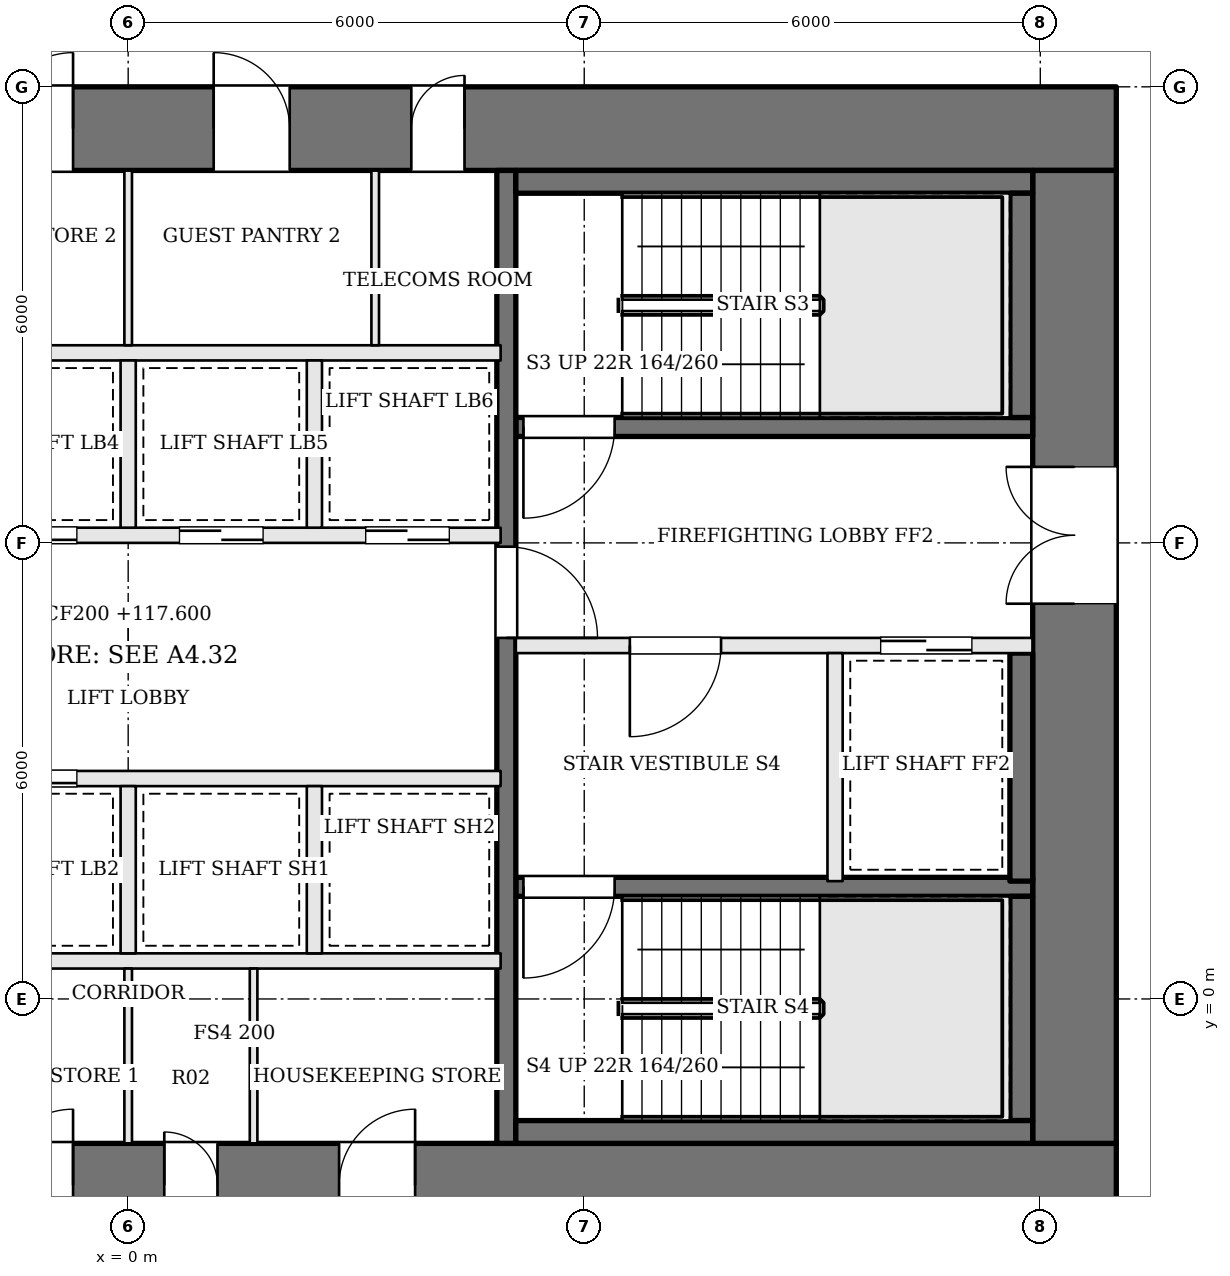
"""IFC4 building model, lengths in metres.
Left out: names, types, materials, properties, quantities, classifications, styles, units other than length and angle.
Written with IfcOpenShell. Run it as: python <this file> out.ifc"""

import sys

from ifc_helpers import new_model, si_unit, direction, frame, frame_2d, origin, place, context, subcontext, project, spatial, rectangle, extrude, element, fill, save


model = new_model("IFC4")
c1 = context("Model", 3, precision=1e-05, world=origin(), true_north=direction((0.0, 1.0)))
c2 = subcontext(c1, "Body", "Model", "MODEL_VIEW")
j1 = project(units=[si_unit("LENGTHUNIT", "METRE"), si_unit("PLANEANGLEUNIT", "RADIAN")], contexts=[c1])
p1 = place(None, origin())
s1 = spatial("IfcSite", under=j1, at=p1, CompositionType="ELEMENT")
p2 = place(p1, origin())
s2 = spatial("IfcBuilding", under=s1, at=p2, CompositionType="ELEMENT")
p3 = place(p2, frame((0.0, 0.0, 117.6)))
s3 = spatial("IfcBuildingStorey", under=s2, at=p3, CompositionType="ELEMENT", Elevation=117.6)
p4 = place(p3, frame((-13.0, 11.45, 0.0), z_axis=(0.0, 0.0, 1.0), x_axis=(1.0, 0.0, 0.0)))
e1 = element("IfcWall", 1, at=p4, inside=s3, PredefinedType="SHEAR", context=c2, shape_type="SweptSolid", body=[
    extrude(rectangle(XDim=26.0, YDim=1.1, at=frame_2d((13.0, 0.0))), origin(), (0.0, 0.0, 1.0), 3.6),
])
p5 = place(p4, frame((8.825, 0.0, 0.0)))
e2 = element("IfcOpeningElement", 2, at=p5, cuts=e1, PredefinedType="OPENING", context=c2, shape_type="SweptSolid", body=[
    extrude(rectangle(XDim=1.0, YDim=2.1, at=frame_2d((0.5, 1.05))), frame((0.0, 0.56, 0.0), z_axis=(0.0, -1.0, 0.0), x_axis=(1.0, 0.0, 0.0)), (0.0, 0.0, 1.0), 1.12),
])
p6 = place(p4, frame((11.275, 0.0, 0.0)))
e3 = element("IfcOpeningElement", 3, at=p6, cuts=e1, PredefinedType="OPENING", context=c2, shape_type="SweptSolid", body=[
    extrude(rectangle(XDim=1.0, YDim=2.1, at=frame_2d((0.5, 1.05))), frame((0.0, 0.56, 0.0), z_axis=(0.0, -1.0, 0.0), x_axis=(1.0, 0.0, 0.0)), (0.0, 0.0, 1.0), 1.12),
])
p7 = place(p4, frame((14.125, 0.0, 0.0)))
e4 = element("IfcOpeningElement", 4, at=p7, cuts=e1, PredefinedType="OPENING", context=c2, shape_type="SweptSolid", body=[
    extrude(rectangle(XDim=1.0, YDim=2.1, at=frame_2d((0.5, 1.05))), frame((0.0, 0.56, 0.0), z_axis=(0.0, -1.0, 0.0), x_axis=(1.0, 0.0, 0.0)), (0.0, 0.0, 1.0), 1.12),
])
p8 = place(p4, frame((16.725, 0.0, 0.0)))
e5 = element("IfcOpeningElement", 5, at=p8, cuts=e1, PredefinedType="OPENING", context=c2, shape_type="SweptSolid", body=[
    extrude(rectangle(XDim=0.7, YDim=2.1, at=frame_2d((0.35, 1.05))), frame((0.0, 0.56, 0.0), z_axis=(0.0, -1.0, 0.0), x_axis=(1.0, 0.0, 0.0)), (0.0, 0.0, 1.0), 1.12),
])
p9 = place(p3, frame((-13.0, -2.45, 0.0), z_axis=(0.0, 0.0, 1.0), x_axis=(1.0, 0.0, 0.0)))
e6 = element("IfcWall", 6, at=p9, inside=s3, PredefinedType="SHEAR", context=c2, shape_type="SweptSolid", body=[
    extrude(rectangle(XDim=26.0, YDim=1.1, at=frame_2d((13.0, 0.0))), origin(), (0.0, 0.0, 1.0), 3.6),
])
p10 = place(p9, frame((8.825, 0.0, 0.0)))
e7 = element("IfcOpeningElement", 7, at=p10, cuts=e6, PredefinedType="OPENING", context=c2, shape_type="SweptSolid", body=[
    extrude(rectangle(XDim=1.0, YDim=2.1, at=frame_2d((0.5, 1.05))), frame((0.0, 0.56, 0.0), z_axis=(0.0, -1.0, 0.0), x_axis=(1.0, 0.0, 0.0)), (0.0, 0.0, 1.0), 1.12),
])
p11 = place(p9, frame((11.275, 0.0, 0.0)))
e8 = element("IfcOpeningElement", 8, at=p11, cuts=e6, PredefinedType="OPENING", context=c2, shape_type="SweptSolid", body=[
    extrude(rectangle(XDim=1.0, YDim=2.1, at=frame_2d((0.5, 1.05))), frame((0.0, 0.56, 0.0), z_axis=(0.0, -1.0, 0.0), x_axis=(1.0, 0.0, 0.0)), (0.0, 0.0, 1.0), 1.12),
])
p12 = place(p9, frame((13.475, 0.0, 0.0)))
e9 = element("IfcOpeningElement", 9, at=p12, cuts=e6, PredefinedType="OPENING", context=c2, shape_type="SweptSolid", body=[
    extrude(rectangle(XDim=0.7, YDim=2.1, at=frame_2d((0.35, 1.05))), frame((0.0, 0.56, 0.0), z_axis=(0.0, -1.0, 0.0), x_axis=(1.0, 0.0, 0.0)), (0.0, 0.0, 1.0), 1.12),
])
p13 = place(p9, frame((15.775, 0.0, 0.0)))
e10 = element("IfcOpeningElement", 10, at=p13, cuts=e6, PredefinedType="OPENING", context=c2, shape_type="SweptSolid", body=[
    extrude(rectangle(XDim=1.0, YDim=2.1, at=frame_2d((0.5, 1.05))), frame((0.0, 0.56, 0.0), z_axis=(0.0, -1.0, 0.0), x_axis=(1.0, 0.0, 0.0)), (0.0, 0.0, 1.0), 1.12),
])
p14 = place(p3, frame((12.45, -1.9, 0.0), z_axis=(0.0, 0.0, 1.0), x_axis=(0.0, 1.0, 0.0)))
e11 = element("IfcWall", 11, at=p14, inside=s3, PredefinedType="SHEAR", context=c2, shape_type="SweptSolid", body=[
    extrude(rectangle(XDim=12.8, YDim=1.1, at=frame_2d((6.4, 0.0))), origin(), (0.0, 0.0, 1.0), 3.6),
])
p15 = place(p14, frame((7.1, 0.0, 0.0)))
e12 = element("IfcOpeningElement", 12, at=p15, cuts=e11, PredefinedType="OPENING", context=c2, shape_type="SweptSolid", body=[
    extrude(rectangle(XDim=1.8, YDim=2.1, at=frame_2d((0.9, 1.05))), frame((0.0, 0.56, 0.0), z_axis=(0.0, -1.0, 0.0), x_axis=(1.0, 0.0, 0.0)), (0.0, 0.0, 1.0), 1.12),
])
p16 = place(p3, frame((11.9, 7.525, 0.0), z_axis=(0.0, 0.0, 1.0), x_axis=(-1.0, 0.0, 0.0)))
e13 = element("IfcWall", 13, at=p16, inside=s3, PredefinedType="SOLIDWALL", context=c2, shape_type="SweptSolid", body=[
    extrude(rectangle(XDim=6.8, YDim=0.25, at=frame_2d((3.4, 0.0))), origin(), (0.0, 0.0, 1.0), 3.3),
])
p17 = place(p16, frame((5.5, 0.0, 0.0)))
e14 = element("IfcOpeningElement", 14, at=p17, cuts=e13, PredefinedType="OPENING", context=c2, shape_type="SweptSolid", body=[
    extrude(rectangle(XDim=1.2, YDim=2.1, at=frame_2d((0.6, 1.05))), frame((0.0, 0.135, 0.0), z_axis=(0.0, -1.0, 0.0), x_axis=(1.0, 0.0, 0.0)), (0.0, 0.0, 1.0), 0.27),
])
p18 = place(p3, frame((11.9, 4.65, 0.0), z_axis=(0.0, 0.0, 1.0), x_axis=(-1.0, 0.0, 0.0)))
e15 = element("IfcWall", 15, at=p18, inside=s3, PredefinedType="SOLIDWALL", context=c2, shape_type="SweptSolid", body=[
    extrude(rectangle(XDim=6.8, YDim=0.2, at=frame_2d((3.4, 0.0))), origin(), (0.0, 0.0, 1.0), 3.3),
])
p19 = place(p18, frame((4.1, 0.0, 0.0)))
e16 = element("IfcOpeningElement", 16, at=p19, cuts=e15, PredefinedType="OPENING", context=c2, shape_type="SweptSolid", body=[
    extrude(rectangle(XDim=1.2, YDim=2.1, at=frame_2d((0.6, 1.05))), frame((0.0, 0.11, 0.0), z_axis=(0.0, -1.0, 0.0), x_axis=(1.0, 0.0, 0.0)), (0.0, 0.0, 1.0), 0.22),
])
p20 = place(p18, frame((0.8, 0.0, 0.0)))
e17 = element("IfcOpeningElement", 17, at=p20, cuts=e15, PredefinedType="OPENING", context=c2, shape_type="SweptSolid", body=[
    extrude(rectangle(XDim=1.2, YDim=2.1, at=frame_2d((0.6, 1.05))), frame((0.0, 0.11, 0.0), z_axis=(0.0, -1.0, 0.0), x_axis=(1.0, 0.0, 0.0)), (0.0, 0.0, 1.0), 0.22),
])
p21 = place(p3, frame((11.9, 1.475, 0.0), z_axis=(0.0, 0.0, 1.0), x_axis=(-1.0, 0.0, 0.0)))
e18 = element("IfcWall", 18, at=p21, inside=s3, PredefinedType="SOLIDWALL", context=c2, shape_type="SweptSolid", body=[
    extrude(rectangle(XDim=6.8, YDim=0.25, at=frame_2d((3.4, 0.0))), origin(), (0.0, 0.0, 1.0), 3.3),
])
p22 = place(p21, frame((5.5, 0.0, 0.0)))
e19 = element("IfcOpeningElement", 19, at=p22, cuts=e18, PredefinedType="OPENING", context=c2, shape_type="SweptSolid", body=[
    extrude(rectangle(XDim=1.2, YDim=2.1, at=frame_2d((0.6, 1.05))), frame((0.0, 0.135, 0.0), z_axis=(0.0, -1.0, 0.0), x_axis=(1.0, 0.0, 0.0)), (0.0, 0.0, 1.0), 0.27),
])
p23 = place(p3, frame((9.3, 4.55, 0.0), z_axis=(0.0, 0.0, 1.0), x_axis=(0.0, -1.0, 0.0)))
e20 = element("IfcWall", 20, at=p23, inside=s3, PredefinedType="SOLIDWALL", context=c2, shape_type="SweptSolid", body=[
    extrude(rectangle(XDim=3.0, YDim=0.2, at=frame_2d((1.5, 0.0))), origin(), (0.0, 0.0, 1.0), 3.3),
])
p24 = place(p3, frame((4.975, 10.9, 0.0), z_axis=(0.0, 0.0, 1.0), x_axis=(0.0, -1.0, 0.0)))
e21 = element("IfcWall", 21, at=p24, inside=s3, PredefinedType="SOLIDWALL", context=c2, shape_type="SweptSolid", body=[
    extrude(rectangle(XDim=12.8, YDim=0.25, at=frame_2d((6.4, 0.0))), origin(), (0.0, 0.0, 1.0), 3.3),
])
p25 = place(p24, frame((4.95, 0.0, 0.0)))
e22 = element("IfcOpeningElement", 22, at=p25, cuts=e21, PredefinedType="OPENING", context=c2, shape_type="SweptSolid", body=[
    extrude(rectangle(XDim=1.2, YDim=2.1, at=frame_2d((0.6, 1.05))), frame((0.0, 0.135, 0.0), z_axis=(0.0, -1.0, 0.0), x_axis=(1.0, 0.0, 0.0)), (0.0, 0.0, 1.0), 0.27),
])
p26 = place(p3, frame((11.9, 10.75, 0.0), z_axis=(0.0, 0.0, 1.0), x_axis=(-1.0, 0.0, 0.0)))
e23 = element("IfcWall", 23, at=p26, inside=s3, PredefinedType="SOLIDWALL", context=c2, shape_type="SweptSolid", body=[
    extrude(rectangle(XDim=6.8, YDim=0.3, at=frame_2d((3.4, 0.0))), origin(), (0.0, 0.0, 1.0), 3.3),
])
p27 = place(p3, frame((11.75, 10.6, 0.0), z_axis=(0.0, 0.0, 1.0), x_axis=(0.0, -1.0, 0.0)))
e24 = element("IfcWall", 24, at=p27, inside=s3, PredefinedType="SOLIDWALL", context=c2, shape_type="SweptSolid", body=[
    extrude(rectangle(XDim=2.95, YDim=0.3, at=frame_2d((1.475, 0.0))), origin(), (0.0, 0.0, 1.0), 3.3),
])
p28 = place(p3, frame((11.75, 4.55, 0.0), z_axis=(0.0, 0.0, 1.0), x_axis=(0.0, -1.0, 0.0)))
e25 = element("IfcWall", 25, at=p28, inside=s3, PredefinedType="SOLIDWALL", context=c2, shape_type="SweptSolid", body=[
    extrude(rectangle(XDim=3.0, YDim=0.3, at=frame_2d((1.5, 0.0))), origin(), (0.0, 0.0, 1.0), 3.3),
])
p29 = place(p3, frame((11.75, 1.35, 0.0), z_axis=(0.0, 0.0, 1.0), x_axis=(0.0, -1.0, 0.0)))
e26 = element("IfcWall", 26, at=p29, inside=s3, PredefinedType="SOLIDWALL", context=c2, shape_type="SweptSolid", body=[
    extrude(rectangle(XDim=2.95, YDim=0.3, at=frame_2d((1.475, 0.0))), origin(), (0.0, 0.0, 1.0), 3.3),
])
p30 = place(p3, frame((11.9, -1.75, 0.0), z_axis=(0.0, 0.0, 1.0), x_axis=(-1.0, 0.0, 0.0)))
e27 = element("IfcWall", 27, at=p30, inside=s3, PredefinedType="SOLIDWALL", context=c2, shape_type="SweptSolid", body=[
    extrude(rectangle(XDim=6.8, YDim=0.3, at=frame_2d((3.4, 0.0))), origin(), (0.0, 0.0, 1.0), 3.3),
])
p31 = place(p3, frame((-4.9, 0.5, 0.0), z_axis=(0.0, 0.0, 1.0), x_axis=(1.0, 0.0, 0.0)))
e28 = element("IfcWall", 28, at=p31, inside=s3, PredefinedType="SOLIDWALL", context=c2, shape_type="SweptSolid", body=[
    extrude(rectangle(XDim=9.8, YDim=0.2, at=frame_2d((4.9, 0.0))), origin(), (0.0, 0.0, 1.0), 3.3),
])
p32 = place(p3, frame((-4.9, 2.9, 0.0), z_axis=(0.0, 0.0, 1.0), x_axis=(1.0, 0.0, 0.0)))
e29 = element("IfcWall", 29, at=p32, inside=s3, PredefinedType="SOLIDWALL", context=c2, shape_type="SweptSolid", body=[
    extrude(rectangle(XDim=9.8, YDim=0.2, at=frame_2d((4.9, 0.0))), origin(), (0.0, 0.0, 1.0), 3.3),
])
p33 = place(p32, frame((0.675, 0.0, 0.0)))
e30 = element("IfcOpeningElement", 30, at=p33, cuts=e29, PredefinedType="OPENING", context=c2, shape_type="SweptSolid", body=[
    extrude(rectangle(XDim=1.1, YDim=2.1, at=frame_2d((0.55, 1.05))), frame((0.0, 0.11, 0.0), z_axis=(0.0, -1.0, 0.0), x_axis=(1.0, 0.0, 0.0)), (0.0, 0.0, 1.0), 0.22),
])
p34 = place(p32, frame((3.125, 0.0, 0.0)))
e31 = element("IfcOpeningElement", 31, at=p34, cuts=e29, PredefinedType="OPENING", context=c2, shape_type="SweptSolid", body=[
    extrude(rectangle(XDim=1.1, YDim=2.1, at=frame_2d((0.55, 1.05))), frame((0.0, 0.11, 0.0), z_axis=(0.0, -1.0, 0.0), x_axis=(1.0, 0.0, 0.0)), (0.0, 0.0, 1.0), 0.22),
])
p35 = place(p3, frame((-4.9, 6.1, 0.0), z_axis=(0.0, 0.0, 1.0), x_axis=(1.0, 0.0, 0.0)))
e32 = element("IfcWall", 32, at=p35, inside=s3, PredefinedType="SOLIDWALL", context=c2, shape_type="SweptSolid", body=[
    extrude(rectangle(XDim=9.8, YDim=0.2, at=frame_2d((4.9, 0.0))), origin(), (0.0, 0.0, 1.0), 3.3),
])
p36 = place(p35, frame((0.675, 0.0, 0.0)))
e33 = element("IfcOpeningElement", 33, at=p36, cuts=e32, PredefinedType="OPENING", context=c2, shape_type="SweptSolid", body=[
    extrude(rectangle(XDim=1.1, YDim=2.1, at=frame_2d((0.55, 1.05))), frame((0.0, 0.11, 0.0), z_axis=(0.0, -1.0, 0.0), x_axis=(1.0, 0.0, 0.0)), (0.0, 0.0, 1.0), 0.22),
])
p37 = place(p35, frame((3.125, 0.0, 0.0)))
e34 = element("IfcOpeningElement", 34, at=p37, cuts=e32, PredefinedType="OPENING", context=c2, shape_type="SweptSolid", body=[
    extrude(rectangle(XDim=1.1, YDim=2.1, at=frame_2d((0.55, 1.05))), frame((0.0, 0.11, 0.0), z_axis=(0.0, -1.0, 0.0), x_axis=(1.0, 0.0, 0.0)), (0.0, 0.0, 1.0), 0.22),
])
p38 = place(p35, frame((5.575, 0.0, 0.0)))
e35 = element("IfcOpeningElement", 35, at=p38, cuts=e32, PredefinedType="OPENING", context=c2, shape_type="SweptSolid", body=[
    extrude(rectangle(XDim=1.1, YDim=2.1, at=frame_2d((0.55, 1.05))), frame((0.0, 0.11, 0.0), z_axis=(0.0, -1.0, 0.0), x_axis=(1.0, 0.0, 0.0)), (0.0, 0.0, 1.0), 0.22),
])
p39 = place(p35, frame((8.025, 0.0, 0.0)))
e36 = element("IfcOpeningElement", 36, at=p39, cuts=e32, PredefinedType="OPENING", context=c2, shape_type="SweptSolid", body=[
    extrude(rectangle(XDim=1.1, YDim=2.1, at=frame_2d((0.55, 1.05))), frame((0.0, 0.11, 0.0), z_axis=(0.0, -1.0, 0.0), x_axis=(1.0, 0.0, 0.0)), (0.0, 0.0, 1.0), 0.22),
])
p40 = place(p3, frame((-4.9, 8.5, 0.0), z_axis=(0.0, 0.0, 1.0), x_axis=(1.0, 0.0, 0.0)))
e37 = element("IfcWall", 37, at=p40, inside=s3, PredefinedType="SOLIDWALL", context=c2, shape_type="SweptSolid", body=[
    extrude(rectangle(XDim=9.8, YDim=0.2, at=frame_2d((4.9, 0.0))), origin(), (0.0, 0.0, 1.0), 3.3),
])
for number, where, z_axis, x_axis in (
    (38, (0.0, 0.6, 0.0), (0.0, 0.0, 1.0), (0.0, 1.0, 0.0)),
    (39, (2.45, 0.6, 0.0), (0.0, 0.0, 1.0), (0.0, 1.0, 0.0)),
    (40, (0.0, 6.2, 0.0), (0.0, 0.0, 1.0), (0.0, 1.0, 0.0)),
    (41, (2.45, 6.2, 0.0), (0.0, 0.0, 1.0), (0.0, 1.0, 0.0)),
):
    element("IfcWall", number, at=place(p3, frame(where, z_axis=z_axis, x_axis=x_axis)), inside=s3, PredefinedType="SOLIDWALL", context=c2, shape_type="SweptSolid", body=[
        extrude(rectangle(XDim=2.2, YDim=0.2, at=frame_2d((1.1, 0.0))), origin(), (0.0, 0.0, 1.0), 3.3),
    ])
for number, where, z_axis, x_axis in (
    (42, (0.0, -1.9, 0.0), (0.0, 0.0, 1.0), (0.0, 1.0, 0.0)),
    (43, (1.65, -1.9, 0.0), (0.0, 0.0, 1.0), (0.0, 1.0, 0.0)),
    (44, (0.0, 8.6, 0.0), (0.0, 0.0, 1.0), (0.0, 1.0, 0.0)),
    (45, (3.25, 8.6, 0.0), (0.0, 0.0, 1.0), (0.0, 1.0, 0.0)),
):
    element("IfcWall", number, at=place(p3, frame(where, z_axis=z_axis, x_axis=x_axis)), inside=s3, PredefinedType="PARTITIONING", context=c2, shape_type="SweptSolid", body=[
        extrude(rectangle(XDim=2.3, YDim=0.1, at=frame_2d((1.15, 0.0))), origin(), (0.0, 0.0, 1.0), 3.3),
    ])
p41 = place(p15, origin())
e46 = element("IfcDoor", 46, at=p41, inside=s3, OperationType="DOUBLE_DOOR_SINGLE_SWING", PredefinedType="DOOR", context=c2, shape_type="SweptSolid", body=[
    extrude(rectangle(XDim=1.8, YDim=2.1, at=frame_2d((0.9, 1.05))), frame((0.0, 0.025, 0.0), z_axis=(0.0, -1.0, 0.0), x_axis=(1.0, 0.0, 0.0)), (0.0, 0.0, 1.0), 0.05),
])
fill(e12, e46)
p42 = place(p25, origin())
e47 = element("IfcDoor", 47, at=p42, inside=s3, OperationType="SINGLE_SWING_RIGHT", PredefinedType="DOOR", context=c2, shape_type="SweptSolid", body=[
    extrude(rectangle(XDim=1.2, YDim=2.1, at=frame_2d((0.6, 1.05))), frame((0.0, 0.025, 0.0), z_axis=(0.0, -1.0, 0.0), x_axis=(1.0, 0.0, 0.0)), (0.0, 0.0, 1.0), 0.05),
])
fill(e22, e47)
p43 = place(p19, origin())
e48 = element("IfcDoor", 48, at=p43, inside=s3, OperationType="SINGLE_SWING_RIGHT", PredefinedType="DOOR", context=c2, shape_type="SweptSolid", body=[
    extrude(rectangle(XDim=1.2, YDim=2.1, at=frame_2d((0.6, 1.05))), frame((0.0, 0.025, 0.0), z_axis=(0.0, -1.0, 0.0), x_axis=(1.0, 0.0, 0.0)), (0.0, 0.0, 1.0), 0.05),
])
fill(e16, e48)
p44 = place(p17, origin())
e49 = element("IfcDoor", 49, at=p44, inside=s3, OperationType="SINGLE_SWING_RIGHT", PredefinedType="DOOR", context=c2, shape_type="SweptSolid", body=[
    extrude(rectangle(XDim=1.2, YDim=2.1, at=frame_2d((0.6, 1.05))), frame((0.0, 0.025, 0.0), z_axis=(0.0, -1.0, 0.0), x_axis=(1.0, 0.0, 0.0)), (0.0, 0.0, 1.0), 0.05),
])
fill(e14, e49)
p45 = place(p22, origin())
e50 = element("IfcDoor", 50, at=p45, inside=s3, OperationType="SINGLE_SWING_RIGHT", PredefinedType="DOOR", context=c2, shape_type="SweptSolid", body=[
    extrude(rectangle(XDim=1.2, YDim=2.1, at=frame_2d((0.6, 1.05))), frame((0.0, 0.025, 0.0), z_axis=(0.0, -1.0, 0.0), x_axis=(1.0, 0.0, 0.0)), (0.0, 0.0, 1.0), 0.05),
])
fill(e19, e50)
p46 = place(p20, origin())
e51 = element("IfcDoor", 51, at=p46, inside=s3, OperationType="SLIDING_TO_RIGHT", PredefinedType="DOOR", context=c2, shape_type="SweptSolid", body=[
    extrude(rectangle(XDim=1.2, YDim=2.1, at=frame_2d((0.6, 1.05))), frame((0.0, 0.025, 0.0), z_axis=(0.0, -1.0, 0.0), x_axis=(1.0, 0.0, 0.0)), (0.0, 0.0, 1.0), 0.05),
])
fill(e17, e51)
p47 = place(p34, origin())
e52 = element("IfcDoor", 52, at=p47, inside=s3, OperationType="SLIDING_TO_LEFT", PredefinedType="DOOR", context=c2, shape_type="SweptSolid", body=[
    extrude(rectangle(XDim=1.1, YDim=2.1, at=frame_2d((0.55, 1.05))), frame((0.0, 0.025, 0.0), z_axis=(0.0, -1.0, 0.0), x_axis=(1.0, 0.0, 0.0)), (0.0, 0.0, 1.0), 0.05),
])
fill(e31, e52)
p48 = place(p37, origin())
e53 = element("IfcDoor", 53, at=p48, inside=s3, OperationType="SLIDING_TO_LEFT", PredefinedType="DOOR", context=c2, shape_type="SweptSolid", body=[
    extrude(rectangle(XDim=1.1, YDim=2.1, at=frame_2d((0.55, 1.05))), frame((0.0, 0.025, 0.0), z_axis=(0.0, -1.0, 0.0), x_axis=(1.0, 0.0, 0.0)), (0.0, 0.0, 1.0), 0.05),
])
fill(e34, e53)
p49 = place(p38, origin())
e54 = element("IfcDoor", 54, at=p49, inside=s3, OperationType="SLIDING_TO_RIGHT", PredefinedType="DOOR", context=c2, shape_type="SweptSolid", body=[
    extrude(rectangle(XDim=1.1, YDim=2.1, at=frame_2d((0.55, 1.05))), frame((0.0, 0.025, 0.0), z_axis=(0.0, -1.0, 0.0), x_axis=(1.0, 0.0, 0.0)), (0.0, 0.0, 1.0), 0.05),
])
fill(e35, e54)
p50 = place(p39, origin())
e55 = element("IfcDoor", 55, at=p50, inside=s3, OperationType="SLIDING_TO_LEFT", PredefinedType="DOOR", context=c2, shape_type="SweptSolid", body=[
    extrude(rectangle(XDim=1.1, YDim=2.1, at=frame_2d((0.55, 1.05))), frame((0.0, 0.025, 0.0), z_axis=(0.0, -1.0, 0.0), x_axis=(1.0, 0.0, 0.0)), (0.0, 0.0, 1.0), 0.05),
])
fill(e36, e55)
p51 = place(p11, origin())
e56 = element("IfcDoor", 56, at=p51, inside=s3, OperationType="SINGLE_SWING_RIGHT", PredefinedType="DOOR", context=c2, shape_type="SweptSolid", body=[
    extrude(rectangle(XDim=1.0, YDim=2.1, at=frame_2d((0.5, 1.05))), frame((0.0, 0.025, 0.0), z_axis=(0.0, -1.0, 0.0), x_axis=(1.0, 0.0, 0.0)), (0.0, 0.0, 1.0), 0.05),
])
fill(e8, e56)
p52 = place(p12, origin())
e57 = element("IfcDoor", 57, at=p52, inside=s3, OperationType="SINGLE_SWING_LEFT", PredefinedType="DOOR", context=c2, shape_type="SweptSolid", body=[
    extrude(rectangle(XDim=0.7, YDim=2.1, at=frame_2d((0.35, 1.05))), frame((0.0, 0.025, 0.0), z_axis=(0.0, -1.0, 0.0), x_axis=(1.0, 0.0, 0.0)), (0.0, 0.0, 1.0), 0.05),
])
fill(e9, e57)
p53 = place(p13, origin())
e58 = element("IfcDoor", 58, at=p53, inside=s3, OperationType="SINGLE_SWING_RIGHT", PredefinedType="DOOR", context=c2, shape_type="SweptSolid", body=[
    extrude(rectangle(XDim=1.0, YDim=2.1, at=frame_2d((0.5, 1.05))), frame((0.0, 0.025, 0.0), z_axis=(0.0, -1.0, 0.0), x_axis=(1.0, 0.0, 0.0)), (0.0, 0.0, 1.0), 0.05),
])
fill(e10, e58)
p54 = place(p6, origin())
e59 = element("IfcDoor", 59, at=p54, inside=s3, OperationType="SINGLE_SWING_RIGHT", PredefinedType="DOOR", context=c2, shape_type="SweptSolid", body=[
    extrude(rectangle(XDim=1.0, YDim=2.1, at=frame_2d((0.5, 1.05))), frame((0.0, 0.025, 0.0), z_axis=(0.0, -1.0, 0.0), x_axis=(1.0, 0.0, 0.0)), (0.0, 0.0, 1.0), 0.05),
])
fill(e3, e59)
p55 = place(p7, origin())
e60 = element("IfcDoor", 60, at=p55, inside=s3, OperationType="SINGLE_SWING_LEFT", PredefinedType="DOOR", context=c2, shape_type="SweptSolid", body=[
    extrude(rectangle(XDim=1.0, YDim=2.1, at=frame_2d((0.5, 1.05))), frame((0.0, 0.025, 0.0), z_axis=(0.0, -1.0, 0.0), x_axis=(1.0, 0.0, 0.0)), (0.0, 0.0, 1.0), 0.05),
])
fill(e4, e60)
p56 = place(p8, origin())
e61 = element("IfcDoor", 61, at=p56, inside=s3, OperationType="SINGLE_SWING_RIGHT", PredefinedType="DOOR", context=c2, shape_type="SweptSolid", body=[
    extrude(rectangle(XDim=0.7, YDim=2.1, at=frame_2d((0.35, 1.05))), frame((0.0, 0.025, 0.0), z_axis=(0.0, -1.0, 0.0), x_axis=(1.0, 0.0, 0.0)), (0.0, 0.0, 1.0), 0.05),
])
fill(e5, e61)
save(model, sys.argv[1])
